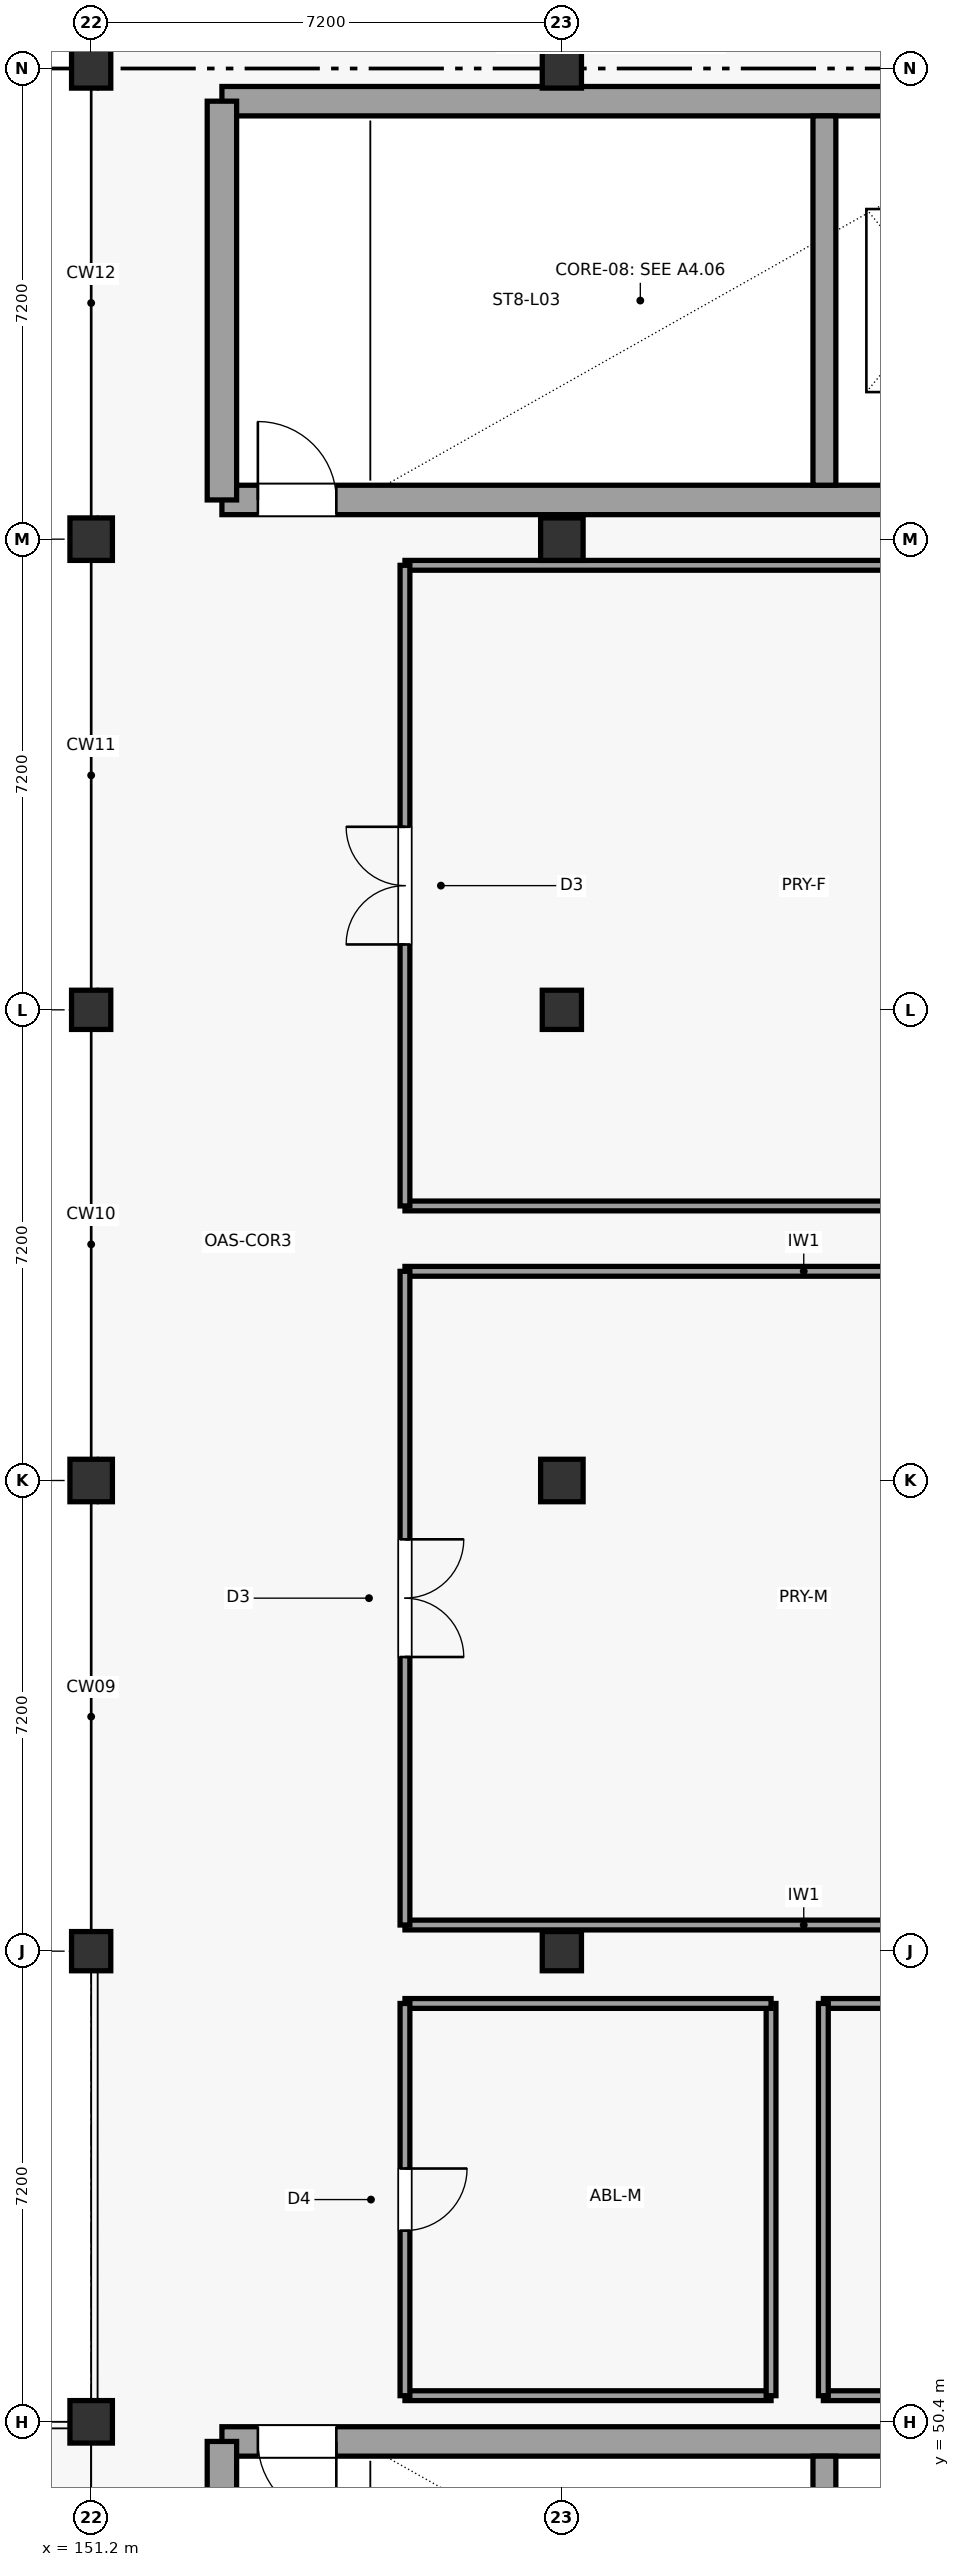
"""IFC4 building model, lengths in metres.
Left out: names, types, materials, properties, quantities, classifications, styles, units other than length and angle.
Written with IfcOpenShell. Run it as: python <this file> out.ifc"""

import sys

from ifc_helpers import new_model, si_unit, direction, frame, frame_2d, origin, origin_2d, place, context, subcontext, project, spatial, rectangle, extrude, element, fill, save


model = new_model("IFC4")
c1 = context("Model", 3, precision=1e-05, world=origin(), true_north=direction((0.0, 1.0)))
c2 = subcontext(c1, "Body", "Model", "MODEL_VIEW")
j1 = project(units=[si_unit("LENGTHUNIT", "METRE"), si_unit("PLANEANGLEUNIT", "RADIAN")], contexts=[c1])
p1 = place(None, origin())
s1 = spatial("IfcSite", under=j1, at=p1, CompositionType="ELEMENT")
p2 = place(p1, origin())
s2 = spatial("IfcBuilding", under=s1, at=p2, CompositionType="ELEMENT")
p3 = place(p2, frame((0.0, 0.0, 13.8)))
s3 = spatial("IfcBuildingStorey", under=s2, at=p3, CompositionType="ELEMENT", Elevation=13.8)
p4 = place(p3, frame((151.2, 50.4, 0.0), z_axis=(0.0, 0.0, 1.0), x_axis=(1.0, 0.0, 0.0)))
e1 = element("IfcColumn", 1, at=p4, inside=s3, PredefinedType="COLUMN", context=c2, shape_type="SweptSolid", body=[
    extrude(rectangle(XDim=0.65, YDim=0.65, at=origin_2d()), origin(), (0.0, 0.0, 1.0), 4.8),
])
p5 = place(p3, frame((151.2, 57.6, 0.0), z_axis=(0.0, 0.0, 1.0), x_axis=(1.0, 0.0, 0.0)))
e2 = element("IfcColumn", 2, at=p5, inside=s3, PredefinedType="COLUMN", context=c2, shape_type="SweptSolid", body=[
    extrude(rectangle(XDim=0.6, YDim=0.6, at=origin_2d()), origin(), (0.0, 0.0, 1.0), 4.8),
])
p6 = place(p3, frame((151.2, 64.8, 0.0), z_axis=(0.0, 0.0, 1.0), x_axis=(1.0, 0.0, 0.0)))
e3 = element("IfcColumn", 3, at=p6, inside=s3, PredefinedType="COLUMN", context=c2, shape_type="SweptSolid", body=[
    extrude(rectangle(XDim=0.65, YDim=0.65, at=origin_2d()), origin(), (0.0, 0.0, 1.0), 4.8),
])
p7 = place(p3, frame((151.2, 72.0, 0.0), z_axis=(0.0, 0.0, 1.0), x_axis=(1.0, 0.0, 0.0)))
e4 = element("IfcColumn", 4, at=p7, inside=s3, PredefinedType="COLUMN", context=c2, shape_type="SweptSolid", body=[
    extrude(rectangle(XDim=0.6, YDim=0.6, at=origin_2d()), origin(), (0.0, 0.0, 1.0), 4.8),
])
p8 = place(p3, frame((151.2, 79.2, 0.0), z_axis=(0.0, 0.0, 1.0), x_axis=(1.0, 0.0, 0.0)))
e5 = element("IfcColumn", 5, at=p8, inside=s3, PredefinedType="COLUMN", context=c2, shape_type="SweptSolid", body=[
    extrude(rectangle(XDim=0.65, YDim=0.65, at=origin_2d()), origin(), (0.0, 0.0, 1.0), 4.8),
])
for number, where, z_axis, x_axis in (
    (6, (151.2, 86.4, 0.0), (0.0, 0.0, 1.0), (1.0, 0.0, 0.0)),
    (7, (158.4, 57.6, 0.0), (0.0, 0.0, 1.0), (1.0, 0.0, 0.0)),
):
    element("IfcColumn", number, at=place(p3, frame(where, z_axis=z_axis, x_axis=x_axis)), inside=s3, PredefinedType="COLUMN", context=c2, shape_type="SweptSolid", body=[
        extrude(rectangle(XDim=0.6, YDim=0.6, at=origin_2d()), origin(), (0.0, 0.0, 1.0), 4.8),
    ])
p9 = place(p3, frame((158.4, 64.8, 0.0), z_axis=(0.0, 0.0, 1.0), x_axis=(1.0, 0.0, 0.0)))
e8 = element("IfcColumn", 8, at=p9, inside=s3, PredefinedType="COLUMN", context=c2, shape_type="SweptSolid", body=[
    extrude(rectangle(XDim=0.65, YDim=0.65, at=origin_2d()), origin(), (0.0, 0.0, 1.0), 4.8),
])
p10 = place(p3, frame((158.4, 72.0, 0.0), z_axis=(0.0, 0.0, 1.0), x_axis=(1.0, 0.0, 0.0)))
e9 = element("IfcColumn", 9, at=p10, inside=s3, PredefinedType="COLUMN", context=c2, shape_type="SweptSolid", body=[
    extrude(rectangle(XDim=0.6, YDim=0.6, at=origin_2d()), origin(), (0.0, 0.0, 1.0), 4.8),
])
p11 = place(p3, frame((158.4, 79.2, 0.0), z_axis=(0.0, 0.0, 1.0), x_axis=(1.0, 0.0, 0.0)))
e10 = element("IfcColumn", 10, at=p11, inside=s3, PredefinedType="COLUMN", context=c2, shape_type="SweptSolid", body=[
    extrude(rectangle(XDim=0.65, YDim=0.65, at=origin_2d()), origin(), (0.0, 0.0, 1.0), 4.8),
])
p12 = place(p3, frame((158.4, 86.4, 0.0), z_axis=(0.0, 0.0, 1.0), x_axis=(1.0, 0.0, 0.0)))
e11 = element("IfcColumn", 11, at=p12, inside=s3, PredefinedType="COLUMN", context=c2, shape_type="SweptSolid", body=[
    extrude(rectangle(XDim=0.6, YDim=0.6, at=origin_2d()), origin(), (0.0, 0.0, 1.0), 4.8),
])
p13 = place(p3, frame((153.2, 50.1, 0.0), z_axis=(0.0, 0.0, 1.0), x_axis=(1.0, 0.0, 0.0)))
e12 = element("IfcWall", 12, at=p13, inside=s3, PredefinedType="SHEAR", context=c2, shape_type="SweptSolid", body=[
    extrude(rectangle(XDim=12.8, YDim=0.45, at=frame_2d((6.4, 0.0))), origin(), (0.0, 0.0, 1.0), 4.53),
])
p14 = place(p13, frame((0.55, 0.0, 0.0)))
e13 = element("IfcOpeningElement", 13, at=p14, cuts=e12, PredefinedType="OPENING", context=c2, shape_type="SweptSolid", body=[
    extrude(rectangle(XDim=1.2, YDim=2.25, at=frame_2d((0.6, 1.125))), frame((0.0, 0.235, 0.0), z_axis=(0.0, -1.0, 0.0), x_axis=(1.0, 0.0, 0.0)), (0.0, 0.0, 1.0), 0.47),
])
p15 = place(p13, frame((10.458, 0.0, 0.0)))
e14 = element("IfcOpeningElement", 14, at=p15, cuts=e12, PredefinedType="OPENING", context=c2, shape_type="SweptSolid", body=[
    extrude(rectangle(XDim=1.1, YDim=2.2, at=frame_2d((0.55, 1.1))), frame((0.0, 0.235, 0.0), z_axis=(0.0, -1.0, 0.0), x_axis=(1.0, 0.0, 0.0)), (0.0, 0.0, 1.0), 0.47),
])
p16 = place(p3, frame((153.2, 44.0, 0.0), z_axis=(0.0, 0.0, 1.0), x_axis=(0.0, 1.0, 0.0)))
e15 = element("IfcWall", 15, at=p16, inside=s3, PredefinedType="SHEAR", context=c2, shape_type="SweptSolid", body=[
    extrude(rectangle(XDim=6.1, YDim=0.45, at=frame_2d((3.05, 0.0))), origin(), (0.0, 0.0, 1.0), 4.53),
])
p17 = place(p3, frame((162.416, 44.225, 0.0), z_axis=(0.0, 0.0, 1.0), x_axis=(0.0, 1.0, 0.0)))
e16 = element("IfcWall", 16, at=p17, inside=s3, PredefinedType="SHEAR", context=c2, shape_type="SweptSolid", body=[
    extrude(rectangle(XDim=5.65, YDim=0.35, at=frame_2d((2.825, 0.0))), origin(), (0.0, 0.0, 1.0), 4.53),
])
p18 = place(p3, frame((153.2, 79.8, 0.0), z_axis=(0.0, 0.0, 1.0), x_axis=(1.0, 0.0, 0.0)))
e17 = element("IfcWall", 17, at=p18, inside=s3, PredefinedType="SHEAR", context=c2, shape_type="SweptSolid", body=[
    extrude(rectangle(XDim=12.8, YDim=0.45, at=frame_2d((6.4, 0.0))), origin(), (0.0, 0.0, 1.0), 4.53),
])
p19 = place(p18, frame((0.55, 0.0, 0.0)))
e18 = element("IfcOpeningElement", 18, at=p19, cuts=e17, PredefinedType="OPENING", context=c2, shape_type="SweptSolid", body=[
    extrude(rectangle(XDim=1.2, YDim=2.25, at=frame_2d((0.6, 1.125))), frame((0.0, 0.235, 0.0), z_axis=(0.0, -1.0, 0.0), x_axis=(1.0, 0.0, 0.0)), (0.0, 0.0, 1.0), 0.47),
])
p20 = place(p18, frame((10.108, 0.0, 0.0)))
e19 = element("IfcOpeningElement", 19, at=p20, cuts=e17, PredefinedType="OPENING", context=c2, shape_type="SweptSolid", body=[
    extrude(rectangle(XDim=1.8, YDim=2.4, at=frame_2d((0.9, 1.2))), frame((0.0, 0.235, 0.0), z_axis=(0.0, -1.0, 0.0), x_axis=(1.0, 0.0, 0.0)), (0.0, 0.0, 1.0), 0.47),
])
p21 = place(p3, frame((153.2, 85.9, 0.0), z_axis=(0.0, 0.0, 1.0), x_axis=(1.0, 0.0, 0.0)))
e20 = element("IfcWall", 20, at=p21, inside=s3, PredefinedType="SHEAR", context=c2, shape_type="SweptSolid", body=[
    extrude(rectangle(XDim=12.8, YDim=0.45, at=frame_2d((6.4, 0.0))), origin(), (0.0, 0.0, 1.0), 4.53),
])
p22 = place(p3, frame((153.2, 79.8, 0.0), z_axis=(0.0, 0.0, 1.0), x_axis=(0.0, 1.0, 0.0)))
e21 = element("IfcWall", 21, at=p22, inside=s3, PredefinedType="SHEAR", context=c2, shape_type="SweptSolid", body=[
    extrude(rectangle(XDim=6.1, YDim=0.45, at=frame_2d((3.05, 0.0))), origin(), (0.0, 0.0, 1.0), 4.53),
])
p23 = place(p3, frame((162.416, 80.025, 0.0), z_axis=(0.0, 0.0, 1.0), x_axis=(0.0, 1.0, 0.0)))
e22 = element("IfcWall", 22, at=p23, inside=s3, PredefinedType="SHEAR", context=c2, shape_type="SweptSolid", body=[
    extrude(rectangle(XDim=5.65, YDim=0.35, at=frame_2d((2.825, 0.0))), origin(), (0.0, 0.0, 1.0), 4.53),
])
for number, where, z_axis, x_axis in (
    (23, (156.0, 58.0, 0.0), (0.0, 0.0, 1.0), (1.0, 0.0, 0.0)),
    (24, (168.2, 68.0, 0.0), (0.0, 0.0, 1.0), (-1.0, 0.0, 0.0)),
):
    element("IfcWall", number, at=place(p3, frame(where, z_axis=z_axis, x_axis=x_axis)), inside=s3, PredefinedType="PARTITIONING", context=c2, shape_type="SweptSolid", body=[
        extrude(rectangle(XDim=12.2, YDim=0.15, at=frame_2d((6.1, 0.0))), origin(), (0.0, 0.0, 1.0), 3.59),
    ])
p24 = place(p3, frame((156.0, 68.0, 0.0), z_axis=(0.0, 0.0, 1.0), x_axis=(0.0, -1.0, 0.0)))
e25 = element("IfcWall", 25, at=p24, inside=s3, PredefinedType="PARTITIONING", context=c2, shape_type="SweptSolid", body=[
    extrude(rectangle(XDim=10.0, YDim=0.15, at=frame_2d((5.0, 0.0))), origin(), (0.0, 0.0, 1.0), 3.59),
])
p25 = place(p24, frame((4.1, 0.0, 0.0)))
e26 = element("IfcOpeningElement", 26, at=p25, cuts=e25, PredefinedType="OPENING", context=c2, shape_type="SweptSolid", body=[
    extrude(rectangle(XDim=1.8, YDim=2.3, at=frame_2d((0.9, 1.15))), frame((0.0, 0.085, 0.0), z_axis=(0.0, -1.0, 0.0), x_axis=(1.0, 0.0, 0.0)), (0.0, 0.0, 1.0), 0.17),
])
for number, where, z_axis, x_axis in (
    (27, (156.0, 69.0, 0.0), (0.0, 0.0, 1.0), (1.0, 0.0, 0.0)),
    (28, (168.2, 78.8, 0.0), (0.0, 0.0, 1.0), (-1.0, 0.0, 0.0)),
):
    element("IfcWall", number, at=place(p3, frame(where, z_axis=z_axis, x_axis=x_axis)), inside=s3, PredefinedType="PARTITIONING", context=c2, shape_type="SweptSolid", body=[
        extrude(rectangle(XDim=12.2, YDim=0.15, at=frame_2d((6.1, 0.0))), origin(), (0.0, 0.0, 1.0), 3.59),
    ])
p26 = place(p3, frame((156.0, 78.8, 0.0), z_axis=(0.0, 0.0, 1.0), x_axis=(0.0, -1.0, 0.0)))
e29 = element("IfcWall", 29, at=p26, inside=s3, PredefinedType="PARTITIONING", context=c2, shape_type="SweptSolid", body=[
    extrude(rectangle(XDim=9.8, YDim=0.15, at=frame_2d((4.9, 0.0))), origin(), (0.0, 0.0, 1.0), 3.59),
])
p27 = place(p26, frame((4.0, 0.0, 0.0)))
e30 = element("IfcOpeningElement", 30, at=p27, cuts=e29, PredefinedType="OPENING", context=c2, shape_type="SweptSolid", body=[
    extrude(rectangle(XDim=1.8, YDim=2.3, at=frame_2d((0.9, 1.15))), frame((0.0, 0.085, 0.0), z_axis=(0.0, -1.0, 0.0), x_axis=(1.0, 0.0, 0.0)), (0.0, 0.0, 1.0), 0.17),
])
p28 = place(p3, frame((156.0, 50.8, 0.0), z_axis=(0.0, 0.0, 1.0), x_axis=(1.0, 0.0, 0.0)))
e31 = element("IfcWall", 31, at=p28, inside=s3, PredefinedType="PARTITIONING", context=c2, shape_type="SweptSolid", body=[
    extrude(rectangle(XDim=5.6, YDim=0.15, at=frame_2d((2.8, 0.0))), origin(), (0.0, 0.0, 1.0), 3.59),
])
p29 = place(p3, frame((161.6, 50.8, 0.0), z_axis=(0.0, 0.0, 1.0), x_axis=(0.0, 1.0, 0.0)))
e32 = element("IfcWall", 32, at=p29, inside=s3, PredefinedType="PARTITIONING", context=c2, shape_type="SweptSolid", body=[
    extrude(rectangle(XDim=6.0, YDim=0.15, at=frame_2d((3.0, 0.0))), origin(), (0.0, 0.0, 1.0), 3.59),
])
p30 = place(p3, frame((161.6, 56.8, 0.0), z_axis=(0.0, 0.0, 1.0), x_axis=(-1.0, 0.0, 0.0)))
e33 = element("IfcWall", 33, at=p30, inside=s3, PredefinedType="PARTITIONING", context=c2, shape_type="SweptSolid", body=[
    extrude(rectangle(XDim=5.6, YDim=0.15, at=frame_2d((2.8, 0.0))), origin(), (0.0, 0.0, 1.0), 3.59),
])
p31 = place(p3, frame((156.0, 56.8, 0.0), z_axis=(0.0, 0.0, 1.0), x_axis=(0.0, -1.0, 0.0)))
e34 = element("IfcWall", 34, at=p31, inside=s3, PredefinedType="PARTITIONING", context=c2, shape_type="SweptSolid", body=[
    extrude(rectangle(XDim=6.0, YDim=0.15, at=frame_2d((3.0, 0.0))), origin(), (0.0, 0.0, 1.0), 3.59),
])
p32 = place(p31, frame((2.525, 0.0, 0.0)))
e35 = element("IfcOpeningElement", 35, at=p32, cuts=e34, PredefinedType="OPENING", context=c2, shape_type="SweptSolid", body=[
    extrude(rectangle(XDim=0.95, YDim=2.15, at=frame_2d((0.475, 1.075))), frame((0.0, 0.085, 0.0), z_axis=(0.0, -1.0, 0.0), x_axis=(1.0, 0.0, 0.0)), (0.0, 0.0, 1.0), 0.17),
])
p33 = place(p3, frame((162.4, 50.8, 0.0), z_axis=(0.0, 0.0, 1.0), x_axis=(1.0, 0.0, 0.0)))
e36 = element("IfcWall", 36, at=p33, inside=s3, PredefinedType="PARTITIONING", context=c2, shape_type="SweptSolid", body=[
    extrude(rectangle(XDim=5.8, YDim=0.15, at=frame_2d((2.9, 0.0))), origin(), (0.0, 0.0, 1.0), 3.59),
])
p34 = place(p33, frame((2.425, 0.0, 0.0)))
e37 = element("IfcOpeningElement", 37, at=p34, cuts=e36, PredefinedType="OPENING", context=c2, shape_type="SweptSolid", body=[
    extrude(rectangle(XDim=0.95, YDim=2.15, at=frame_2d((0.475, 1.075))), frame((0.0, 0.085, 0.0), z_axis=(0.0, -1.0, 0.0), x_axis=(1.0, 0.0, 0.0)), (0.0, 0.0, 1.0), 0.17),
])
p35 = place(p3, frame((168.2, 56.8, 0.0), z_axis=(0.0, 0.0, 1.0), x_axis=(-1.0, 0.0, 0.0)))
e38 = element("IfcWall", 38, at=p35, inside=s3, PredefinedType="PARTITIONING", context=c2, shape_type="SweptSolid", body=[
    extrude(rectangle(XDim=5.8, YDim=0.15, at=frame_2d((2.9, 0.0))), origin(), (0.0, 0.0, 1.0), 3.59),
])
p36 = place(p3, frame((162.4, 56.8, 0.0), z_axis=(0.0, 0.0, 1.0), x_axis=(0.0, -1.0, 0.0)))
e39 = element("IfcWall", 39, at=p36, inside=s3, PredefinedType="PARTITIONING", context=c2, shape_type="SweptSolid", body=[
    extrude(rectangle(XDim=6.0, YDim=0.15, at=frame_2d((3.0, 0.0))), origin(), (0.0, 0.0, 1.0), 3.59),
])
p37 = place(p14, frame((1.2, 0.0, 0.0), z_axis=(0.0, 0.0, 1.0), x_axis=(-1.0, 0.0, 0.0)))
e40 = element("IfcDoor", 40, at=p37, inside=s3, OperationType="SINGLE_SWING_RIGHT", PredefinedType="DOOR", context=c2, shape_type="SweptSolid", body=[
    extrude(rectangle(XDim=1.2, YDim=2.25, at=frame_2d((0.6, 1.125))), frame((0.0, 0.025, 0.0), z_axis=(0.0, -1.0, 0.0), x_axis=(1.0, 0.0, 0.0)), (0.0, 0.0, 1.0), 0.05),
])
fill(e13, e40)
p38 = place(p19, origin())
e41 = element("IfcDoor", 41, at=p38, inside=s3, OperationType="SINGLE_SWING_LEFT", PredefinedType="DOOR", context=c2, shape_type="SweptSolid", body=[
    extrude(rectangle(XDim=1.2, YDim=2.25, at=frame_2d((0.6, 1.125))), frame((0.0, 0.025, 0.0), z_axis=(0.0, -1.0, 0.0), x_axis=(1.0, 0.0, 0.0)), (0.0, 0.0, 1.0), 0.05),
])
fill(e18, e41)
p39 = place(p25, origin())
e42 = element("IfcDoor", 42, at=p39, inside=s3, OperationType="DOUBLE_DOOR_SINGLE_SWING", PredefinedType="DOOR", context=c2, shape_type="SweptSolid", body=[
    extrude(rectangle(XDim=1.8, YDim=2.3, at=frame_2d((0.9, 1.15))), frame((0.0, 0.025, 0.0), z_axis=(0.0, -1.0, 0.0), x_axis=(1.0, 0.0, 0.0)), (0.0, 0.0, 1.0), 0.05),
])
fill(e26, e42)
p40 = place(p27, frame((1.8, 0.0, 0.0), z_axis=(0.0, 0.0, 1.0), x_axis=(-1.0, 0.0, 0.0)))
e43 = element("IfcDoor", 43, at=p40, inside=s3, OperationType="DOUBLE_DOOR_SINGLE_SWING", PredefinedType="DOOR", context=c2, shape_type="SweptSolid", body=[
    extrude(rectangle(XDim=1.8, YDim=2.3, at=frame_2d((0.9, 1.15))), frame((0.0, 0.025, 0.0), z_axis=(0.0, -1.0, 0.0), x_axis=(1.0, 0.0, 0.0)), (0.0, 0.0, 1.0), 0.05),
])
fill(e30, e43)
p41 = place(p32, origin())
e44 = element("IfcDoor", 44, at=p41, inside=s3, OperationType="SINGLE_SWING_LEFT", PredefinedType="DOOR", context=c2, shape_type="SweptSolid", body=[
    extrude(rectangle(XDim=0.95, YDim=2.15, at=frame_2d((0.475, 1.075))), frame((0.0, 0.025, 0.0), z_axis=(0.0, -1.0, 0.0), x_axis=(1.0, 0.0, 0.0)), (0.0, 0.0, 1.0), 0.05),
])
fill(e35, e44)
save(model, sys.argv[1])
